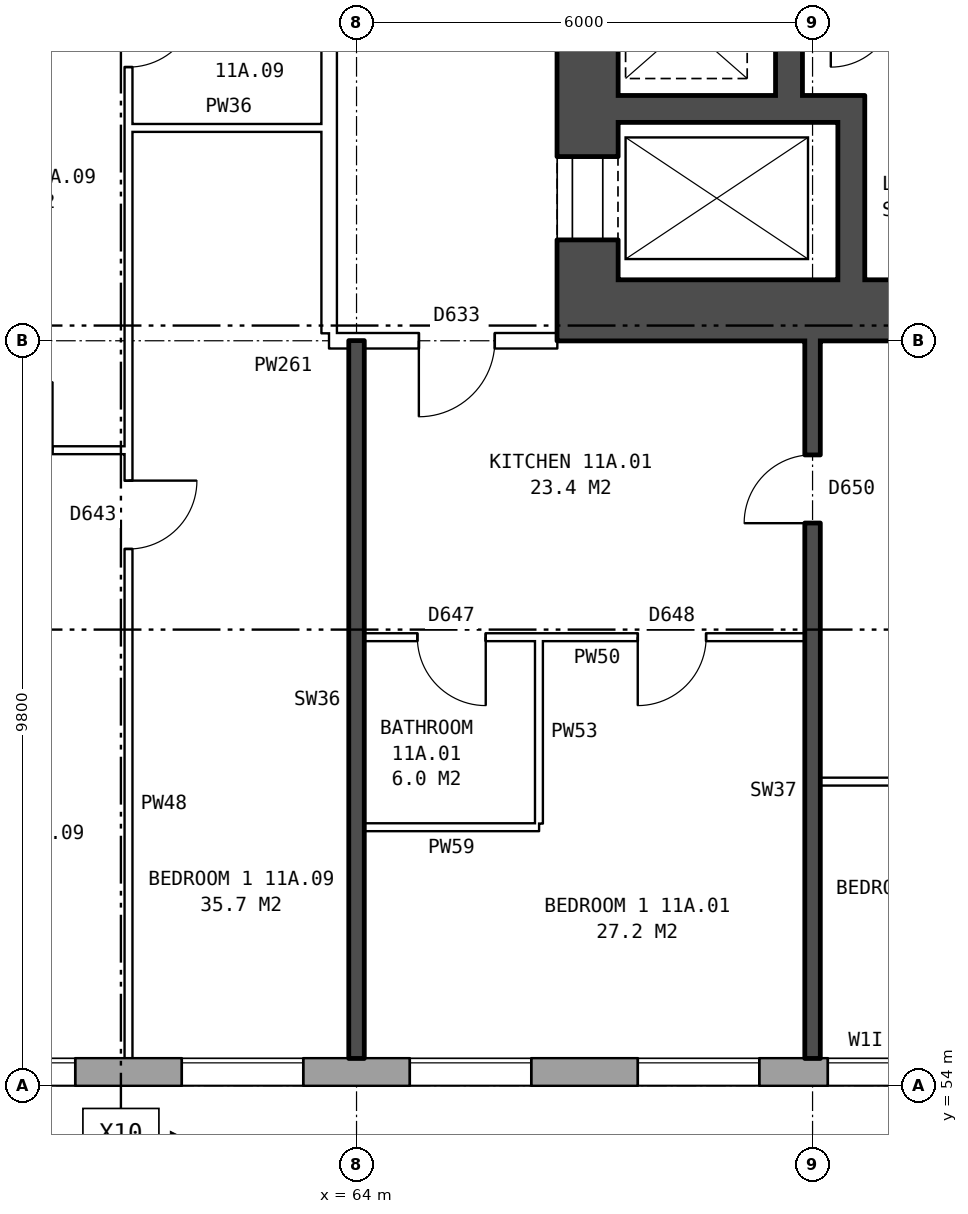
"""IFC4 building model, lengths in metres.
Left out: names, types, materials, properties, quantities, classifications, styles, units other than length and angle.
Written with IfcOpenShell. Run it as: python <this file> out.ifc"""

import sys

from ifc_helpers import new_model, si_unit, direction, frame, frame_2d, origin, place, context, subcontext, project, spatial, rectangle, extrude, element, fill, save


model = new_model("IFC4")
c1 = context("Model", 3, precision=1e-05, world=origin(), true_north=direction((0.0, 1.0)))
c2 = subcontext(c1, "Body", "Model", "MODEL_VIEW")
j1 = project(units=[si_unit("LENGTHUNIT", "METRE"), si_unit("PLANEANGLEUNIT", "RADIAN")], contexts=[c1])
p1 = place(None, origin())
s1 = spatial("IfcSite", under=j1, at=p1, CompositionType="ELEMENT")
p2 = place(p1, origin())
s2 = spatial("IfcBuilding", under=s1, at=p2, CompositionType="ELEMENT")
p3 = place(p2, frame((0.0, 0.0, 44.3)))
s3 = spatial("IfcBuildingStorey", under=s2, at=p3, CompositionType="ELEMENT", Elevation=44.3)
p4 = place(p3, frame((24.575, 54.18, 0.0), z_axis=(0.0, 0.0, 1.0), x_axis=(1.0, 0.0, 0.0)))
e1 = element("IfcWall", 1, at=p4, inside=s3, PredefinedType="STANDARD", context=c2, shape_type="SweptSolid", body=[
    extrude(rectangle(XDim=48.351, YDim=0.36, at=frame_2d((24.175, 0.0))), origin(), (0.0, 0.0, 1.0), 2.85),
])
p5 = place(p4, frame((0.65, 0.0, 0.8)))
e2 = element("IfcOpeningElement", 2, at=p5, cuts=e1, PredefinedType="OPENING", context=c2, shape_type="SweptSolid", body=[
    extrude(rectangle(XDim=1.0, YDim=0.9, at=frame_2d((0.5, 0.45))), frame((0.0, 0.19, 0.0), z_axis=(0.0, -1.0, 0.0), x_axis=(1.0, 0.0, 0.0)), (0.0, 0.0, 1.0), 0.38),
])
p6 = place(p4, frame((4.125, 0.0, 0.8)))
e3 = element("IfcOpeningElement", 3, at=p6, cuts=e1, PredefinedType="OPENING", context=c2, shape_type="SweptSolid", body=[
    extrude(rectangle(XDim=1.6, YDim=1.8, at=frame_2d((0.8, 0.9))), frame((0.0, 0.19, 0.0), z_axis=(0.0, -1.0, 0.0), x_axis=(1.0, 0.0, 0.0)), (0.0, 0.0, 1.0), 0.38),
])
p7 = place(p4, frame((7.125, 0.0, 0.8)))
e4 = element("IfcOpeningElement", 4, at=p7, cuts=e1, PredefinedType="OPENING", context=c2, shape_type="SweptSolid", body=[
    extrude(rectangle(XDim=1.6, YDim=1.8, at=frame_2d((0.8, 0.9))), frame((0.0, 0.19, 0.0), z_axis=(0.0, -1.0, 0.0), x_axis=(1.0, 0.0, 0.0)), (0.0, 0.0, 1.0), 0.38),
])
p8 = place(p4, frame((10.125, 0.0, 0.8)))
e5 = element("IfcOpeningElement", 5, at=p8, cuts=e1, PredefinedType="OPENING", context=c2, shape_type="SweptSolid", body=[
    extrude(rectangle(XDim=1.6, YDim=1.8, at=frame_2d((0.8, 0.9))), frame((0.0, 0.19, 0.0), z_axis=(0.0, -1.0, 0.0), x_axis=(1.0, 0.0, 0.0)), (0.0, 0.0, 1.0), 0.38),
])
p9 = place(p4, frame((13.125, 0.0, 0.8)))
e6 = element("IfcOpeningElement", 6, at=p9, cuts=e1, PredefinedType="OPENING", context=c2, shape_type="SweptSolid", body=[
    extrude(rectangle(XDim=1.6, YDim=1.8, at=frame_2d((0.8, 0.9))), frame((0.0, 0.19, 0.0), z_axis=(0.0, -1.0, 0.0), x_axis=(1.0, 0.0, 0.0)), (0.0, 0.0, 1.0), 0.38),
])
p10 = place(p4, frame((16.125, 0.0, 0.8)))
e7 = element("IfcOpeningElement", 7, at=p10, cuts=e1, PredefinedType="OPENING", context=c2, shape_type="SweptSolid", body=[
    extrude(rectangle(XDim=1.6, YDim=1.8, at=frame_2d((0.8, 0.9))), frame((0.0, 0.19, 0.0), z_axis=(0.0, -1.0, 0.0), x_axis=(1.0, 0.0, 0.0)), (0.0, 0.0, 1.0), 0.38),
])
p11 = place(p4, frame((19.125, 0.0, 0.8)))
e8 = element("IfcOpeningElement", 8, at=p11, cuts=e1, PredefinedType="OPENING", context=c2, shape_type="SweptSolid", body=[
    extrude(rectangle(XDim=1.6, YDim=1.8, at=frame_2d((0.8, 0.9))), frame((0.0, 0.19, 0.0), z_axis=(0.0, -1.0, 0.0), x_axis=(1.0, 0.0, 0.0)), (0.0, 0.0, 1.0), 0.38),
])
p12 = place(p4, frame((22.125, 0.0, 0.8)))
e9 = element("IfcOpeningElement", 9, at=p12, cuts=e1, PredefinedType="OPENING", context=c2, shape_type="SweptSolid", body=[
    extrude(rectangle(XDim=1.6, YDim=1.8, at=frame_2d((0.8, 0.9))), frame((0.0, 0.19, 0.0), z_axis=(0.0, -1.0, 0.0), x_axis=(1.0, 0.0, 0.0)), (0.0, 0.0, 1.0), 0.38),
])
p13 = place(p4, frame((25.125, 0.0, 0.8)))
e10 = element("IfcOpeningElement", 10, at=p13, cuts=e1, PredefinedType="OPENING", context=c2, shape_type="SweptSolid", body=[
    extrude(rectangle(XDim=1.6, YDim=1.8, at=frame_2d((0.8, 0.9))), frame((0.0, 0.19, 0.0), z_axis=(0.0, -1.0, 0.0), x_axis=(1.0, 0.0, 0.0)), (0.0, 0.0, 1.0), 0.38),
])
p14 = place(p4, frame((28.125, 0.0, 0.8)))
e11 = element("IfcOpeningElement", 11, at=p14, cuts=e1, PredefinedType="OPENING", context=c2, shape_type="SweptSolid", body=[
    extrude(rectangle(XDim=1.6, YDim=1.8, at=frame_2d((0.8, 0.9))), frame((0.0, 0.19, 0.0), z_axis=(0.0, -1.0, 0.0), x_axis=(1.0, 0.0, 0.0)), (0.0, 0.0, 1.0), 0.38),
])
p15 = place(p4, frame((31.125, 0.0, 0.8)))
e12 = element("IfcOpeningElement", 12, at=p15, cuts=e1, PredefinedType="OPENING", context=c2, shape_type="SweptSolid", body=[
    extrude(rectangle(XDim=1.6, YDim=1.8, at=frame_2d((0.8, 0.9))), frame((0.0, 0.19, 0.0), z_axis=(0.0, -1.0, 0.0), x_axis=(1.0, 0.0, 0.0)), (0.0, 0.0, 1.0), 0.38),
])
p16 = place(p4, frame((34.125, 0.0, 0.8)))
e13 = element("IfcOpeningElement", 13, at=p16, cuts=e1, PredefinedType="OPENING", context=c2, shape_type="SweptSolid", body=[
    extrude(rectangle(XDim=1.6, YDim=1.8, at=frame_2d((0.8, 0.9))), frame((0.0, 0.19, 0.0), z_axis=(0.0, -1.0, 0.0), x_axis=(1.0, 0.0, 0.0)), (0.0, 0.0, 1.0), 0.38),
])
p17 = place(p4, frame((37.125, 0.0, 0.8)))
e14 = element("IfcOpeningElement", 14, at=p17, cuts=e1, PredefinedType="OPENING", context=c2, shape_type="SweptSolid", body=[
    extrude(rectangle(XDim=1.6, YDim=1.8, at=frame_2d((0.8, 0.9))), frame((0.0, 0.19, 0.0), z_axis=(0.0, -1.0, 0.0), x_axis=(1.0, 0.0, 0.0)), (0.0, 0.0, 1.0), 0.38),
])
p18 = place(p4, frame((40.125, 0.0, 0.8)))
e15 = element("IfcOpeningElement", 15, at=p18, cuts=e1, PredefinedType="OPENING", context=c2, shape_type="SweptSolid", body=[
    extrude(rectangle(XDim=1.6, YDim=1.8, at=frame_2d((0.8, 0.9))), frame((0.0, 0.19, 0.0), z_axis=(0.0, -1.0, 0.0), x_axis=(1.0, 0.0, 0.0)), (0.0, 0.0, 1.0), 0.38),
])
p19 = place(p4, frame((43.125, 0.0, 0.8)))
e16 = element("IfcOpeningElement", 16, at=p19, cuts=e1, PredefinedType="OPENING", context=c2, shape_type="SweptSolid", body=[
    extrude(rectangle(XDim=1.6, YDim=1.8, at=frame_2d((0.8, 0.9))), frame((0.0, 0.19, 0.0), z_axis=(0.0, -1.0, 0.0), x_axis=(1.0, 0.0, 0.0)), (0.0, 0.0, 1.0), 0.38),
])
p20 = place(p4, frame((45.625, 0.0, 0.8)))
e17 = element("IfcOpeningElement", 17, at=p20, cuts=e1, PredefinedType="OPENING", context=c2, shape_type="SweptSolid", body=[
    extrude(rectangle(XDim=1.0, YDim=1.5, at=frame_2d((0.5, 0.75))), frame((0.0, 0.19, 0.0), z_axis=(0.0, -1.0, 0.0), x_axis=(1.0, 0.0, 0.0)), (0.0, 0.0, 1.0), 0.38),
])
p21 = place(p4, frame((2.0, 0.0, 0.8)))
e18 = element("IfcOpeningElement", 18, at=p21, cuts=e1, PredefinedType="OPENING", context=c2, shape_type="SweptSolid", body=[
    extrude(rectangle(XDim=1.2, YDim=1.8, at=frame_2d((0.6, 0.9))), frame((0.0, 0.19, 0.0), z_axis=(0.0, -1.0, 0.0), x_axis=(1.0, 0.0, 0.0)), (0.0, 0.0, 1.0), 0.38),
])
p22 = place(p4, frame((46.925, 0.0, 0.8)))
e19 = element("IfcOpeningElement", 19, at=p22, cuts=e1, PredefinedType="OPENING", context=c2, shape_type="SweptSolid", body=[
    extrude(rectangle(XDim=0.6, YDim=0.9, at=frame_2d((0.3, 0.45))), frame((0.0, 0.19, 0.0), z_axis=(0.0, -1.0, 0.0), x_axis=(1.0, 0.0, 0.0)), (0.0, 0.0, 1.0), 0.38),
])
p23 = place(p3, frame((67.04, 64.6, 0.0), z_axis=(0.0, 0.0, 1.0), x_axis=(0.0, 1.0, 0.0)))
e20 = element("IfcWall", 20, at=p23, inside=s3, PredefinedType="SHEAR", context=c2, shape_type="SweptSolid", body=[
    extrude(rectangle(XDim=10.8, YDim=0.8, at=frame_2d((5.4, 0.0))), origin(), (0.0, 0.0, 1.0), 2.85),
])
p24 = place(p23, frame((0.525, 0.0, 0.0)))
e21 = element("IfcOpeningElement", 21, at=p24, cuts=e20, PredefinedType="OPENING", context=c2, shape_type="SweptSolid", body=[
    extrude(rectangle(XDim=1.1, YDim=2.1, at=frame_2d((0.55, 1.05))), frame((0.0, 0.41, 0.0), z_axis=(0.0, -1.0, 0.0), x_axis=(1.0, 0.0, 0.0)), (0.0, 0.0, 1.0), 0.82),
])
p25 = place(p23, frame((9.1, 0.0, 0.0)))
e22 = element("IfcOpeningElement", 22, at=p25, cuts=e20, PredefinedType="OPENING", context=c2, shape_type="SweptSolid", body=[
    extrude(rectangle(XDim=1.1, YDim=2.1, at=frame_2d((0.55, 1.05))), frame((0.0, 0.41, 0.0), z_axis=(0.0, -1.0, 0.0), x_axis=(1.0, 0.0, 0.0)), (0.0, 0.0, 1.0), 0.82),
])
p26 = place(p3, frame((66.64, 64.2, 0.0), z_axis=(0.0, 0.0, 1.0), x_axis=(1.0, 0.0, 0.0)))
e23 = element("IfcWall", 23, at=p26, inside=s3, PredefinedType="SHEAR", context=c2, shape_type="SweptSolid", body=[
    extrude(rectangle(XDim=9.0, YDim=0.8, at=frame_2d((4.5, 0.0))), origin(), (0.0, 0.0, 1.0), 2.85),
])
p27 = place(p3, frame((67.44, 66.85, 0.0), z_axis=(0.0, 0.0, 1.0), x_axis=(1.0, 0.0, 0.0)))
e24 = element("IfcWall", 24, at=p27, inside=s3, PredefinedType="SHEAR", context=c2, shape_type="SweptSolid", body=[
    extrude(rectangle(XDim=3.245, YDim=0.35, at=frame_2d((1.623, 0.0))), origin(), (0.0, 0.0, 1.0), 2.85),
])
p28 = place(p3, frame((69.69, 67.025, 0.0), z_axis=(0.0, 0.0, 1.0), x_axis=(0.0, 1.0, 0.0)))
e25 = element("IfcWall", 25, at=p28, inside=s3, PredefinedType="SHEAR", context=c2, shape_type="SweptSolid", body=[
    extrude(rectangle(XDim=6.6, YDim=0.35, at=frame_2d((3.3, 0.0))), origin(), (0.0, 0.0, 1.0), 2.85),
])
p29 = place(p3, frame((70.51, 64.6, 0.0), z_axis=(0.0, 0.0, 1.0), x_axis=(0.0, 1.0, 0.0)))
e26 = element("IfcWall", 26, at=p29, inside=s3, PredefinedType="SHEAR", context=c2, shape_type="SweptSolid", body=[
    extrude(rectangle(XDim=2.075, YDim=0.35, at=frame_2d((1.038, 0.0))), origin(), (0.0, 0.0, 1.0), 2.85),
])
p30 = place(p3, frame((63.64, 63.9, 0.0), z_axis=(0.0, 0.0, 1.0), x_axis=(0.0, 1.0, 0.0)))
e27 = element("IfcWall", 27, at=p30, inside=s3, PredefinedType="PARTITIONING", context=c2, shape_type="SweptSolid", body=[
    extrude(rectangle(XDim=12.2, YDim=0.2, at=frame_2d((6.1, 0.0))), origin(), (0.0, 0.0, 1.0), 2.85),
])
p31 = place(p30, frame((5.1, 0.0, 0.0)))
e28 = element("IfcOpeningElement", 28, at=p31, cuts=e27, PredefinedType="OPENING", context=c2, shape_type="SweptSolid", body=[
    extrude(rectangle(XDim=2.0, YDim=2.1, at=frame_2d((1.0, 1.05))), frame((0.0, 0.11, 0.0), z_axis=(0.0, -1.0, 0.0), x_axis=(1.0, 0.0, 0.0)), (0.0, 0.0, 1.0), 0.22),
])
p32 = place(p3, frame((64.1, 57.4, 0.0), z_axis=(0.0, 0.0, 1.0), x_axis=(1.0, 0.0, 0.0)))
e29 = element("IfcWall", 29, at=p32, inside=s3, PredefinedType="PARTITIONING", context=c2, shape_type="SweptSolid", body=[
    extrude(rectangle(XDim=2.3, YDim=0.1, at=frame_2d((1.15, 0.0))), origin(), (0.0, 0.0, 1.0), 2.85),
])
p33 = place(p3, frame((70.1, 58.0, 0.0), z_axis=(0.0, 0.0, 1.0), x_axis=(1.0, 0.0, 0.0)))
e30 = element("IfcWall", 30, at=p33, inside=s3, PredefinedType="PARTITIONING", context=c2, shape_type="SweptSolid", body=[
    extrude(rectangle(XDim=5.54, YDim=0.1, at=frame_2d((2.77, 0.0))), origin(), (0.0, 0.0, 1.0), 2.85),
])
p34 = place(p33, frame((2.32, 0.0, 0.0)))
e31 = element("IfcOpeningElement", 31, at=p34, cuts=e30, PredefinedType="OPENING", context=c2, shape_type="SweptSolid", body=[
    extrude(rectangle(XDim=0.9, YDim=2.1, at=frame_2d((0.45, 1.05))), frame((0.0, 0.06, 0.0), z_axis=(0.0, -1.0, 0.0), x_axis=(1.0, 0.0, 0.0)), (0.0, 0.0, 1.0), 0.12),
])
p35 = place(p3, frame((64.1, 59.9, 0.0), z_axis=(0.0, 0.0, 1.0), x_axis=(1.0, 0.0, 0.0)))
e32 = element("IfcWall", 32, at=p35, inside=s3, PredefinedType="PARTITIONING", context=c2, shape_type="SweptSolid", body=[
    extrude(rectangle(XDim=5.8, YDim=0.1, at=frame_2d((2.9, 0.0))), origin(), (0.0, 0.0, 1.0), 2.85),
])
p36 = place(p35, frame((3.6, 0.0, 0.0)))
e33 = element("IfcOpeningElement", 33, at=p36, cuts=e32, PredefinedType="OPENING", context=c2, shape_type="SweptSolid", body=[
    extrude(rectangle(XDim=0.9, YDim=2.1, at=frame_2d((0.45, 1.05))), frame((0.0, 0.06, 0.0), z_axis=(0.0, -1.0, 0.0), x_axis=(1.0, 0.0, 0.0)), (0.0, 0.0, 1.0), 0.12),
])
p37 = place(p35, frame((0.7, 0.0, 0.0)))
e34 = element("IfcOpeningElement", 34, at=p37, cuts=e32, PredefinedType="OPENING", context=c2, shape_type="SweptSolid", body=[
    extrude(rectangle(XDim=0.9, YDim=2.1, at=frame_2d((0.45, 1.05))), frame((0.0, 0.06, 0.0), z_axis=(0.0, -1.0, 0.0), x_axis=(1.0, 0.0, 0.0)), (0.0, 0.0, 1.0), 0.12),
])
p38 = place(p3, frame((58.1, 62.36, 0.0), z_axis=(0.0, 0.0, 1.0), x_axis=(1.0, 0.0, 0.0)))
e35 = element("IfcWall", 35, at=p38, inside=s3, PredefinedType="PARTITIONING", context=c2, shape_type="SweptSolid", body=[
    extrude(rectangle(XDim=2.9, YDim=0.1, at=frame_2d((1.45, 0.0))), origin(), (0.0, 0.0, 1.0), 2.85),
])
p39 = place(p38, frame((1.0, 0.0, 0.0)))
e36 = element("IfcOpeningElement", 36, at=p39, cuts=e35, PredefinedType="OPENING", context=c2, shape_type="SweptSolid", body=[
    extrude(rectangle(XDim=0.9, YDim=2.1, at=frame_2d((0.45, 1.05))), frame((0.0, 0.06, 0.0), z_axis=(0.0, -1.0, 0.0), x_axis=(1.0, 0.0, 0.0)), (0.0, 0.0, 1.0), 0.12),
])
p40 = place(p3, frame((63.64, 63.8, 0.0), z_axis=(0.0, 0.0, 1.0), x_axis=(1.0, 0.0, 0.0)))
e37 = element("IfcWall", 37, at=p40, inside=s3, PredefinedType="PARTITIONING", context=c2, shape_type="SweptSolid", body=[
    extrude(rectangle(XDim=3.0, YDim=0.2, at=frame_2d((1.5, 0.0))), origin(), (0.0, 0.0, 1.0), 2.85),
])
p41 = place(p40, frame((1.18, 0.0, 0.0)))
e38 = element("IfcOpeningElement", 38, at=p41, cuts=e37, PredefinedType="OPENING", context=c2, shape_type="SweptSolid", body=[
    extrude(rectangle(XDim=1.0, YDim=2.1, at=frame_2d((0.5, 1.05))), frame((0.0, 0.11, 0.0), z_axis=(0.0, -1.0, 0.0), x_axis=(1.0, 0.0, 0.0)), (0.0, 0.0, 1.0), 0.22),
])
p42 = place(p3, frame((61.0, 66.6, 0.0), z_axis=(0.0, 0.0, 1.0), x_axis=(1.0, 0.0, 0.0)))
e39 = element("IfcWall", 39, at=p42, inside=s3, PredefinedType="PARTITIONING", context=c2, shape_type="SweptSolid", body=[
    extrude(rectangle(XDim=2.64, YDim=0.1, at=frame_2d((1.32, 0.0))), origin(), (0.0, 0.0, 1.0), 2.85),
])
p43 = place(p3, frame((61.0, 54.36, 0.0), z_axis=(0.0, 0.0, 1.0), x_axis=(0.0, 1.0, 0.0)))
e40 = element("IfcWall", 40, at=p43, inside=s3, PredefinedType="PARTITIONING", context=c2, shape_type="SweptSolid", body=[
    extrude(rectangle(XDim=14.34, YDim=0.1, at=frame_2d((7.17, 0.0))), origin(), (0.0, 0.0, 1.0), 2.85),
])
p44 = place(p43, frame((6.7, 0.0, 0.0)))
e41 = element("IfcOpeningElement", 41, at=p44, cuts=e40, PredefinedType="OPENING", context=c2, shape_type="SweptSolid", body=[
    extrude(rectangle(XDim=0.9, YDim=2.1, at=frame_2d((0.45, 1.05))), frame((0.0, 0.06, 0.0), z_axis=(0.0, -1.0, 0.0), x_axis=(1.0, 0.0, 0.0)), (0.0, 0.0, 1.0), 0.12),
])
p45 = place(p43, frame((13.04, 0.0, 0.0)))
e42 = element("IfcOpeningElement", 42, at=p45, cuts=e40, PredefinedType="OPENING", context=c2, shape_type="SweptSolid", body=[
    extrude(rectangle(XDim=0.9, YDim=2.1, at=frame_2d((0.45, 1.05))), frame((0.0, 0.06, 0.0), z_axis=(0.0, -1.0, 0.0), x_axis=(1.0, 0.0, 0.0)), (0.0, 0.0, 1.0), 0.12),
])
p46 = place(p3, frame((64.0, 54.36, 0.0), z_axis=(0.0, 0.0, 1.0), x_axis=(0.0, 1.0, 0.0)))
e43 = element("IfcWall", 43, at=p46, inside=s3, PredefinedType="SOLIDWALL", context=c2, shape_type="SweptSolid", body=[
    extrude(rectangle(XDim=9.44, YDim=0.2, at=frame_2d((4.72, 0.0))), origin(), (0.0, 0.0, 1.0), 2.85),
])
p47 = place(p3, frame((66.4, 57.45, 0.0), z_axis=(0.0, 0.0, 1.0), x_axis=(0.0, 1.0, 0.0)))
e44 = element("IfcWall", 44, at=p47, inside=s3, PredefinedType="PARTITIONING", context=c2, shape_type="SweptSolid", body=[
    extrude(rectangle(XDim=2.4, YDim=0.1, at=frame_2d((1.2, 0.0))), origin(), (0.0, 0.0, 1.0), 2.85),
])
p48 = place(p3, frame((70.0, 54.36, 0.0), z_axis=(0.0, 0.0, 1.0), x_axis=(0.0, 1.0, 0.0)))
e45 = element("IfcWall", 45, at=p48, inside=s3, PredefinedType="SOLIDWALL", context=c2, shape_type="SweptSolid", body=[
    extrude(rectangle(XDim=9.44, YDim=0.2, at=frame_2d((4.72, 0.0))), origin(), (0.0, 0.0, 1.0), 2.85),
])
p49 = place(p48, frame((7.04, 0.0, 0.0)))
e46 = element("IfcOpeningElement", 46, at=p49, cuts=e45, PredefinedType="OPENING", context=c2, shape_type="SweptSolid", body=[
    extrude(rectangle(XDim=0.9, YDim=2.1, at=frame_2d((0.45, 1.05))), frame((0.0, 0.11, 0.0), z_axis=(0.0, -1.0, 0.0), x_axis=(1.0, 0.0, 0.0)), (0.0, 0.0, 1.0), 0.22),
])
p50 = place(p16, origin())
e47 = element("IfcWindow", 47, at=p50, inside=s3, PartitioningType="SINGLE_PANEL", PredefinedType="WINDOW", context=c2, shape_type="SweptSolid", body=[
    extrude(rectangle(XDim=1.6, YDim=1.8, at=frame_2d((0.8, 0.9))), frame((0.0, 0.15, 0.0), z_axis=(0.0, -1.0, 0.0), x_axis=(1.0, 0.0, 0.0)), (0.0, 0.0, 1.0), 0.06),
])
fill(e13, e47)
p51 = place(p17, origin())
e48 = element("IfcWindow", 48, at=p51, inside=s3, PartitioningType="SINGLE_PANEL", PredefinedType="WINDOW", context=c2, shape_type="SweptSolid", body=[
    extrude(rectangle(XDim=1.6, YDim=1.8, at=frame_2d((0.8, 0.9))), frame((0.0, 0.15, 0.0), z_axis=(0.0, -1.0, 0.0), x_axis=(1.0, 0.0, 0.0)), (0.0, 0.0, 1.0), 0.06),
])
fill(e14, e48)
p52 = place(p18, origin())
e49 = element("IfcWindow", 49, at=p52, inside=s3, PartitioningType="SINGLE_PANEL", PredefinedType="WINDOW", context=c2, shape_type="SweptSolid", body=[
    extrude(rectangle(XDim=1.6, YDim=1.8, at=frame_2d((0.8, 0.9))), frame((0.0, 0.15, 0.0), z_axis=(0.0, -1.0, 0.0), x_axis=(1.0, 0.0, 0.0)), (0.0, 0.0, 1.0), 0.06),
])
fill(e15, e49)
p53 = place(p19, origin())
e50 = element("IfcWindow", 50, at=p53, inside=s3, PartitioningType="SINGLE_PANEL", PredefinedType="WINDOW", context=c2, shape_type="SweptSolid", body=[
    extrude(rectangle(XDim=1.6, YDim=1.8, at=frame_2d((0.8, 0.9))), frame((0.0, 0.15, 0.0), z_axis=(0.0, -1.0, 0.0), x_axis=(1.0, 0.0, 0.0)), (0.0, 0.0, 1.0), 0.06),
])
fill(e16, e50)
p54 = place(p20, origin())
e51 = element("IfcWindow", 51, at=p54, inside=s3, PartitioningType="SINGLE_PANEL", PredefinedType="WINDOW", context=c2, shape_type="SweptSolid", body=[
    extrude(rectangle(XDim=1.0, YDim=1.5, at=frame_2d((0.5, 0.75))), frame((0.0, 0.15, 0.0), z_axis=(0.0, -1.0, 0.0), x_axis=(1.0, 0.0, 0.0)), (0.0, 0.0, 1.0), 0.06),
])
fill(e17, e51)
p55 = place(p24, origin())
e52 = element("IfcDoor", 52, at=p55, inside=s3, OperationType="DOUBLE_DOOR_SLIDING", PredefinedType="DOOR", context=c2, shape_type="SweptSolid", body=[
    extrude(rectangle(XDim=1.1, YDim=2.1, at=frame_2d((0.55, 1.05))), frame((0.0, -0.335, 0.0), z_axis=(0.0, -1.0, 0.0), x_axis=(1.0, 0.0, 0.0)), (0.0, 0.0, 1.0), 0.05),
])
fill(e21, e52)
p56 = place(p36, frame((0.9, 0.0, 0.0), z_axis=(0.0, 0.0, 1.0), x_axis=(-1.0, 0.0, 0.0)))
e53 = element("IfcDoor", 53, at=p56, inside=s3, OperationType="SINGLE_SWING_RIGHT", PredefinedType="DOOR", context=c2, shape_type="SweptSolid", body=[
    extrude(rectangle(XDim=0.9, YDim=2.1, at=frame_2d((0.45, 1.05))), frame((0.0, 0.025, 0.0), z_axis=(0.0, -1.0, 0.0), x_axis=(1.0, 0.0, 0.0)), (0.0, 0.0, 1.0), 0.05),
])
fill(e33, e53)
p57 = place(p41, frame((1.0, 0.0, 0.0), z_axis=(0.0, 0.0, 1.0), x_axis=(-1.0, 0.0, 0.0)))
e54 = element("IfcDoor", 54, at=p57, inside=s3, OperationType="SINGLE_SWING_RIGHT", PredefinedType="DOOR", context=c2, shape_type="SweptSolid", body=[
    extrude(rectangle(XDim=1.0, YDim=2.1, at=frame_2d((0.5, 1.05))), frame((0.0, 0.025, 0.0), z_axis=(0.0, -1.0, 0.0), x_axis=(1.0, 0.0, 0.0)), (0.0, 0.0, 1.0), 0.05),
])
fill(e38, e54)
p58 = place(p49, origin())
e55 = element("IfcDoor", 55, at=p58, inside=s3, OperationType="SINGLE_SWING_LEFT", PredefinedType="DOOR", context=c2, shape_type="SweptSolid", body=[
    extrude(rectangle(XDim=0.9, YDim=2.1, at=frame_2d((0.45, 1.05))), frame((0.0, 0.025, 0.0), z_axis=(0.0, -1.0, 0.0), x_axis=(1.0, 0.0, 0.0)), (0.0, 0.0, 1.0), 0.05),
])
fill(e46, e55)
p59 = place(p37, frame((0.9, 0.0, 0.0), z_axis=(0.0, 0.0, 1.0), x_axis=(-1.0, 0.0, 0.0)))
e56 = element("IfcDoor", 56, at=p59, inside=s3, OperationType="SINGLE_SWING_LEFT", PredefinedType="DOOR", context=c2, shape_type="SweptSolid", body=[
    extrude(rectangle(XDim=0.9, YDim=2.1, at=frame_2d((0.45, 1.05))), frame((0.0, 0.025, 0.0), z_axis=(0.0, -1.0, 0.0), x_axis=(1.0, 0.0, 0.0)), (0.0, 0.0, 1.0), 0.05),
])
fill(e34, e56)
p60 = place(p44, frame((0.9, 0.0, 0.0), z_axis=(0.0, 0.0, 1.0), x_axis=(-1.0, 0.0, 0.0)))
e57 = element("IfcDoor", 57, at=p60, inside=s3, OperationType="SINGLE_SWING_LEFT", PredefinedType="DOOR", context=c2, shape_type="SweptSolid", body=[
    extrude(rectangle(XDim=0.9, YDim=2.1, at=frame_2d((0.45, 1.05))), frame((0.0, 0.025, 0.0), z_axis=(0.0, -1.0, 0.0), x_axis=(1.0, 0.0, 0.0)), (0.0, 0.0, 1.0), 0.05),
])
fill(e41, e57)
p61 = place(p45, frame((0.9, 0.0, 0.0), z_axis=(0.0, 0.0, 1.0), x_axis=(-1.0, 0.0, 0.0)))
e58 = element("IfcDoor", 58, at=p61, inside=s3, OperationType="SINGLE_SWING_LEFT", PredefinedType="DOOR", context=c2, shape_type="SweptSolid", body=[
    extrude(rectangle(XDim=0.9, YDim=2.1, at=frame_2d((0.45, 1.05))), frame((0.0, 0.025, 0.0), z_axis=(0.0, -1.0, 0.0), x_axis=(1.0, 0.0, 0.0)), (0.0, 0.0, 1.0), 0.05),
])
fill(e42, e58)
save(model, sys.argv[1])
